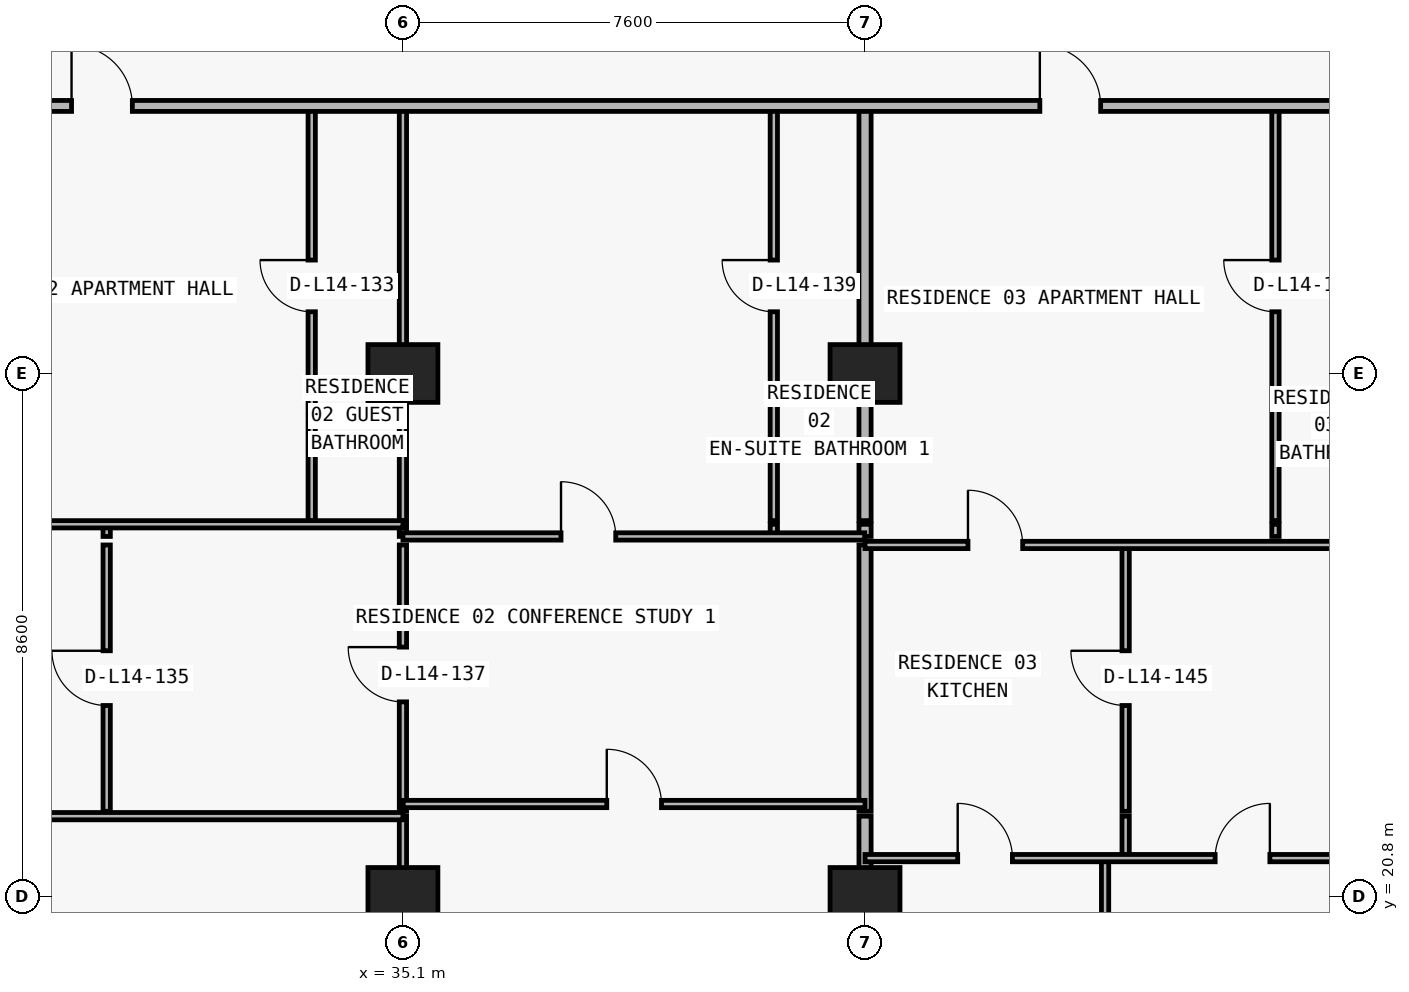
"""IFC4 building model, lengths in metres.
Left out: names, types, materials, properties, quantities, classifications, styles, units other than length and angle.
Written with IfcOpenShell. Run it as: python <this file> out.ifc"""

import sys

from ifc_helpers import new_model, si_unit, direction, frame, frame_2d, origin, origin_2d, place, context, subcontext, project, spatial, rectangle, extrude, element, fill, save


model = new_model("IFC4")
c1 = context("Model", 3, precision=1e-05, world=origin(), true_north=direction((0.0, 1.0)))
c2 = subcontext(c1, "Body", "Model", "MODEL_VIEW")
j1 = project(units=[si_unit("LENGTHUNIT", "METRE"), si_unit("PLANEANGLEUNIT", "RADIAN")], contexts=[c1])
p1 = place(None, origin())
s1 = spatial("IfcSite", under=j1, at=p1, CompositionType="ELEMENT")
p2 = place(p1, origin())
s2 = spatial("IfcBuilding", under=s1, at=p2, CompositionType="ELEMENT")
p3 = place(p2, frame((0.0, 0.0, 56.4)))
s3 = spatial("IfcBuildingStorey", under=s2, at=p3, CompositionType="ELEMENT", Elevation=56.4)
for number, where, z_axis, x_axis in (
    (1, (35.1, 20.8, 0.0), (0.0, 0.0, 1.0), (1.0, 0.0, 0.0)),
    (2, (42.7, 20.8, 0.0), (0.0, 0.0, 1.0), (1.0, 0.0, 0.0)),
    (3, (35.1, 29.4, 0.0), (0.0, 0.0, 1.0), (1.0, 0.0, 0.0)),
    (4, (42.7, 29.4, 0.0), (0.0, 0.0, 1.0), (1.0, 0.0, 0.0)),
):
    element("IfcColumn", number, at=place(p3, frame(where, z_axis=z_axis, x_axis=x_axis)), inside=s3, PredefinedType="COLUMN", context=c2, shape_type="SweptSolid", body=[
        extrude(rectangle(XDim=1.15, YDim=0.95, at=origin_2d()), origin(), (0.0, 0.0, 1.0), 3.05),
    ])
p4 = place(p3, frame((30.228, 22.2, 0.0), z_axis=(0.0, 0.0, 1.0), x_axis=(0.0, 1.0, 0.0)))
e5 = element("IfcWall", 5, at=p4, inside=s3, PredefinedType="PARTITIONING", context=c2, shape_type="SweptSolid", body=[
    extrude(rectangle(XDim=4.38, YDim=0.12, at=frame_2d((2.19, 0.0))), origin(), (0.0, 0.0, 1.0), 3.05),
])
p5 = place(p4, frame((1.74, 0.0, 0.0)))
e6 = element("IfcOpeningElement", 6, at=p5, cuts=e5, PredefinedType="OPENING", context=c2, shape_type="SweptSolid", body=[
    extrude(rectangle(XDim=0.9, YDim=2.15, at=frame_2d((0.45, 1.075))), frame((0.0, 0.07, 0.0), z_axis=(0.0, -1.0, 0.0), x_axis=(1.0, 0.0, 0.0)), (0.0, 0.0, 1.0), 0.14),
])
p6 = place(p3, frame((30.228, 26.72, 0.0), z_axis=(0.0, 0.0, 1.0), x_axis=(0.0, 1.0, 0.0)))
e7 = element("IfcWall", 7, at=p6, inside=s3, PredefinedType="PARTITIONING", context=c2, shape_type="SweptSolid", body=[
    extrude(rectangle(XDim=0.2, YDim=0.12, at=frame_2d((0.1, 0.0))), origin(), (0.0, 0.0, 1.0), 3.05),
])
p7 = place(p3, frame((33.6, 26.98, 0.0), z_axis=(0.0, 0.0, 1.0), x_axis=(0.0, 1.0, 0.0)))
e8 = element("IfcWall", 8, at=p7, inside=s3, PredefinedType="PARTITIONING", context=c2, shape_type="SweptSolid", body=[
    extrude(rectangle(XDim=6.82, YDim=0.12, at=frame_2d((3.41, 0.0))), origin(), (0.0, 0.0, 1.0), 3.05),
])
p8 = place(p7, frame((3.435, 0.0, 0.0)))
e9 = element("IfcOpeningElement", 9, at=p8, cuts=e8, PredefinedType="OPENING", context=c2, shape_type="SweptSolid", body=[
    extrude(rectangle(XDim=0.85, YDim=2.1, at=frame_2d((0.425, 1.05))), frame((0.0, 0.07, 0.0), z_axis=(0.0, -1.0, 0.0), x_axis=(1.0, 0.0, 0.0)), (0.0, 0.0, 1.0), 0.14),
])
p9 = place(p3, frame((35.1, 6.24, 0.0), z_axis=(0.0, 0.0, 1.0), x_axis=(0.0, 1.0, 0.0)))
e10 = element("IfcWall", 10, at=p9, inside=s3, PredefinedType="PARTITIONING", context=c2, shape_type="SweptSolid", body=[
    extrude(rectangle(XDim=15.88, YDim=0.12, at=frame_2d((7.94, 0.0))), origin(), (0.0, 0.0, 1.0), 2.11),
])
p10 = place(p3, frame((35.1, 22.2, 0.0), z_axis=(0.0, 0.0, 1.0), x_axis=(0.0, 1.0, 0.0)))
e11 = element("IfcWall", 11, at=p10, inside=s3, PredefinedType="PARTITIONING", context=c2, shape_type="SweptSolid", body=[
    extrude(rectangle(XDim=4.38, YDim=0.12, at=frame_2d((2.19, 0.0))), origin(), (0.0, 0.0, 1.0), 2.11),
])
p11 = place(p10, frame((1.8, 0.0, 0.0)))
e12 = element("IfcOpeningElement", 12, at=p11, cuts=e11, PredefinedType="OPENING", context=c2, shape_type="SweptSolid", body=[
    extrude(rectangle(XDim=0.9, YDim=2.06, at=frame_2d((0.45, 1.03))), frame((0.0, 0.07, 0.0), z_axis=(0.0, -1.0, 0.0), x_axis=(1.0, 0.0, 0.0)), (0.0, 0.0, 1.0), 0.14),
])
p12 = place(p3, frame((35.1, 26.72, 0.0), z_axis=(0.0, 0.0, 1.0), x_axis=(0.0, 1.0, 0.0)))
e13 = element("IfcWall", 13, at=p12, inside=s3, PredefinedType="PARTITIONING", context=c2, shape_type="SweptSolid", body=[
    extrude(rectangle(XDim=0.2, YDim=0.12, at=frame_2d((0.1, 0.0))), origin(), (0.0, 0.0, 1.0), 2.11),
])
p13 = place(p3, frame((35.1, 26.98, 0.0), z_axis=(0.0, 0.0, 1.0), x_axis=(0.0, 1.0, 0.0)))
e14 = element("IfcWall", 14, at=p13, inside=s3, PredefinedType="PARTITIONING", context=c2, shape_type="SweptSolid", body=[
    extrude(rectangle(XDim=6.82, YDim=0.12, at=frame_2d((3.41, 0.0))), origin(), (0.0, 0.0, 1.0), 2.11),
])
p14 = place(p3, frame((41.2, 26.72, 0.0), z_axis=(0.0, 0.0, 1.0), x_axis=(0.0, 1.0, 0.0)))
e15 = element("IfcWall", 15, at=p14, inside=s3, PredefinedType="PARTITIONING", context=c2, shape_type="SweptSolid", body=[
    extrude(rectangle(XDim=0.2, YDim=0.12, at=frame_2d((0.1, 0.0))), origin(), (0.0, 0.0, 1.0), 3.05),
])
p15 = place(p3, frame((41.2, 26.98, 0.0), z_axis=(0.0, 0.0, 1.0), x_axis=(0.0, 1.0, 0.0)))
e16 = element("IfcWall", 16, at=p15, inside=s3, PredefinedType="PARTITIONING", context=c2, shape_type="SweptSolid", body=[
    extrude(rectangle(XDim=6.82, YDim=0.12, at=frame_2d((3.41, 0.0))), origin(), (0.0, 0.0, 1.0), 3.05),
])
p16 = place(p15, frame((3.435, 0.0, 0.0)))
e17 = element("IfcOpeningElement", 17, at=p16, cuts=e16, PredefinedType="OPENING", context=c2, shape_type="SweptSolid", body=[
    extrude(rectangle(XDim=0.85, YDim=2.1, at=frame_2d((0.425, 1.05))), frame((0.0, 0.07, 0.0), z_axis=(0.0, -1.0, 0.0), x_axis=(1.0, 0.0, 0.0)), (0.0, 0.0, 1.0), 0.14),
])
p17 = place(p3, frame((42.7, 6.24, 0.0), z_axis=(0.0, 0.0, 1.0), x_axis=(0.0, 1.0, 0.0)))
e18 = element("IfcWall", 18, at=p17, inside=s3, PredefinedType="PARTITIONING", context=c2, shape_type="SweptSolid", body=[
    extrude(rectangle(XDim=15.88, YDim=0.2, at=frame_2d((7.94, 0.0))), origin(), (0.0, 0.0, 1.0), 2.11),
])
p18 = place(p3, frame((42.7, 22.2, 0.0), z_axis=(0.0, 0.0, 1.0), x_axis=(0.0, 1.0, 0.0)))
e19 = element("IfcWall", 19, at=p18, inside=s3, PredefinedType="PARTITIONING", context=c2, shape_type="SweptSolid", body=[
    extrude(rectangle(XDim=4.38, YDim=0.2, at=frame_2d((2.19, 0.0))), origin(), (0.0, 0.0, 1.0), 2.11),
])
p19 = place(p3, frame((42.7, 26.72, 0.0), z_axis=(0.0, 0.0, 1.0), x_axis=(0.0, 1.0, 0.0)))
e20 = element("IfcWall", 20, at=p19, inside=s3, PredefinedType="PARTITIONING", context=c2, shape_type="SweptSolid", body=[
    extrude(rectangle(XDim=0.2, YDim=0.2, at=frame_2d((0.1, 0.0))), origin(), (0.0, 0.0, 1.0), 2.11),
])
p20 = place(p3, frame((42.7, 26.98, 0.0), z_axis=(0.0, 0.0, 1.0), x_axis=(0.0, 1.0, 0.0)))
e21 = element("IfcWall", 21, at=p20, inside=s3, PredefinedType="PARTITIONING", context=c2, shape_type="SweptSolid", body=[
    extrude(rectangle(XDim=6.82, YDim=0.2, at=frame_2d((3.41, 0.0))), origin(), (0.0, 0.0, 1.0), 2.11),
])
p21 = place(p3, frame((46.648, 6.24, 0.0), z_axis=(0.0, 0.0, 1.0), x_axis=(0.0, 1.0, 0.0)))
e22 = element("IfcWall", 22, at=p21, inside=s3, PredefinedType="PARTITIONING", context=c2, shape_type="SweptSolid", body=[
    extrude(rectangle(XDim=15.19, YDim=0.12, at=frame_2d((7.595, 0.0))), origin(), (0.0, 0.0, 1.0), 3.05),
])
p22 = place(p3, frame((46.986, 21.43, 0.0), z_axis=(0.0, 0.0, 1.0), x_axis=(0.0, 1.0, 0.0)))
e23 = element("IfcWall", 23, at=p22, inside=s3, PredefinedType="PARTITIONING", context=c2, shape_type="SweptSolid", body=[
    extrude(rectangle(XDim=0.69, YDim=0.12, at=frame_2d((0.345, 0.0))), origin(), (0.0, 0.0, 1.0), 3.05),
])
p23 = place(p3, frame((46.986, 22.2, 0.0), z_axis=(0.0, 0.0, 1.0), x_axis=(0.0, 1.0, 0.0)))
e24 = element("IfcWall", 24, at=p23, inside=s3, PredefinedType="PARTITIONING", context=c2, shape_type="SweptSolid", body=[
    extrude(rectangle(XDim=4.38, YDim=0.12, at=frame_2d((2.19, 0.0))), origin(), (0.0, 0.0, 1.0), 3.05),
])
p24 = place(p23, frame((1.74, 0.0, 0.0)))
e25 = element("IfcOpeningElement", 25, at=p24, cuts=e24, PredefinedType="OPENING", context=c2, shape_type="SweptSolid", body=[
    extrude(rectangle(XDim=0.9, YDim=2.15, at=frame_2d((0.45, 1.075))), frame((0.0, 0.07, 0.0), z_axis=(0.0, -1.0, 0.0), x_axis=(1.0, 0.0, 0.0)), (0.0, 0.0, 1.0), 0.14),
])
p25 = place(p3, frame((49.45, 26.72, 0.0), z_axis=(0.0, 0.0, 1.0), x_axis=(0.0, 1.0, 0.0)))
e26 = element("IfcWall", 26, at=p25, inside=s3, PredefinedType="PARTITIONING", context=c2, shape_type="SweptSolid", body=[
    extrude(rectangle(XDim=0.2, YDim=0.12, at=frame_2d((0.1, 0.0))), origin(), (0.0, 0.0, 1.0), 3.05),
])
p26 = place(p3, frame((49.45, 26.98, 0.0), z_axis=(0.0, 0.0, 1.0), x_axis=(0.0, 1.0, 0.0)))
e27 = element("IfcWall", 27, at=p26, inside=s3, PredefinedType="PARTITIONING", context=c2, shape_type="SweptSolid", body=[
    extrude(rectangle(XDim=6.82, YDim=0.12, at=frame_2d((3.41, 0.0))), origin(), (0.0, 0.0, 1.0), 3.05),
])
p27 = place(p26, frame((3.435, 0.0, 0.0)))
e28 = element("IfcOpeningElement", 28, at=p27, cuts=e27, PredefinedType="OPENING", context=c2, shape_type="SweptSolid", body=[
    extrude(rectangle(XDim=0.85, YDim=2.1, at=frame_2d((0.425, 1.05))), frame((0.0, 0.07, 0.0), z_axis=(0.0, -1.0, 0.0), x_axis=(1.0, 0.0, 0.0)), (0.0, 0.0, 1.0), 0.14),
])
p28 = place(p3, frame((42.7, 21.43, 0.0), z_axis=(0.0, 0.0, 1.0), x_axis=(1.0, 0.0, 0.0)))
e29 = element("IfcWall", 29, at=p28, inside=s3, PredefinedType="PARTITIONING", context=c2, shape_type="SweptSolid", body=[
    extrude(rectangle(XDim=8.13, YDim=0.12, at=frame_2d((4.065, 0.0))), origin(), (0.0, 0.0, 1.0), 3.05),
])
p29 = place(p28, frame((1.524, 0.0, 0.0)))
e30 = element("IfcOpeningElement", 30, at=p29, cuts=e29, PredefinedType="OPENING", context=c2, shape_type="SweptSolid", body=[
    extrude(rectangle(XDim=0.9, YDim=2.15, at=frame_2d((0.45, 1.075))), frame((0.0, 0.07, 0.0), z_axis=(0.0, -1.0, 0.0), x_axis=(1.0, 0.0, 0.0)), (0.0, 0.0, 1.0), 0.14),
])
p30 = place(p28, frame((5.758, 0.0, 0.0)))
e31 = element("IfcOpeningElement", 31, at=p30, cuts=e29, PredefinedType="OPENING", context=c2, shape_type="SweptSolid", body=[
    extrude(rectangle(XDim=0.9, YDim=2.15, at=frame_2d((0.45, 1.075))), frame((0.0, 0.07, 0.0), z_axis=(0.0, -1.0, 0.0), x_axis=(1.0, 0.0, 0.0)), (0.0, 0.0, 1.0), 0.14),
])
p31 = place(p3, frame((26.97, 22.12, 0.0), z_axis=(0.0, 0.0, 1.0), x_axis=(1.0, 0.0, 0.0)))
e32 = element("IfcWall", 32, at=p31, inside=s3, PredefinedType="PARTITIONING", context=c2, shape_type="SweptSolid", body=[
    extrude(rectangle(XDim=8.13, YDim=0.12, at=frame_2d((4.065, 0.0))), origin(), (0.0, 0.0, 1.0), 3.05),
])
p32 = place(p31, frame((1.179, 0.0, 0.0)))
e33 = element("IfcOpeningElement", 33, at=p32, cuts=e32, PredefinedType="OPENING", context=c2, shape_type="SweptSolid", body=[
    extrude(rectangle(XDim=0.9, YDim=2.15, at=frame_2d((0.45, 1.075))), frame((0.0, 0.07, 0.0), z_axis=(0.0, -1.0, 0.0), x_axis=(1.0, 0.0, 0.0)), (0.0, 0.0, 1.0), 0.14),
])
p33 = place(p3, frame((35.105, 22.32, 0.0), z_axis=(0.0, 0.0, 1.0), x_axis=(1.0, 0.0, 0.0)))
e34 = element("IfcWall", 34, at=p33, inside=s3, PredefinedType="PARTITIONING", context=c2, shape_type="SweptSolid", body=[
    extrude(rectangle(XDim=7.595, YDim=0.12, at=frame_2d((3.797, 0.0))), origin(), (0.0, 0.0, 1.0), 3.05),
])
p34 = place(p33, frame((3.347, 0.0, 0.0)))
e35 = element("IfcOpeningElement", 35, at=p34, cuts=e34, PredefinedType="OPENING", context=c2, shape_type="SweptSolid", body=[
    extrude(rectangle(XDim=0.9, YDim=2.15, at=frame_2d((0.45, 1.075))), frame((0.0, 0.07, 0.0), z_axis=(0.0, -1.0, 0.0), x_axis=(1.0, 0.0, 0.0)), (0.0, 0.0, 1.0), 0.14),
])
p35 = place(p3, frame((42.7, 26.58, 0.0), z_axis=(0.0, 0.0, 1.0), x_axis=(1.0, 0.0, 0.0)))
e36 = element("IfcWall", 36, at=p35, inside=s3, PredefinedType="PARTITIONING", context=c2, shape_type="SweptSolid", body=[
    extrude(rectangle(XDim=8.13, YDim=0.12, at=frame_2d((4.065, 0.0))), origin(), (0.0, 0.0, 1.0), 3.05),
])
p36 = place(p35, frame((1.693, 0.0, 0.0)))
e37 = element("IfcOpeningElement", 37, at=p36, cuts=e36, PredefinedType="OPENING", context=c2, shape_type="SweptSolid", body=[
    extrude(rectangle(XDim=0.9, YDim=2.15, at=frame_2d((0.45, 1.075))), frame((0.0, 0.07, 0.0), z_axis=(0.0, -1.0, 0.0), x_axis=(1.0, 0.0, 0.0)), (0.0, 0.0, 1.0), 0.14),
])
p37 = place(p3, frame((35.1, 26.72, 0.0), z_axis=(0.0, 0.0, 1.0), x_axis=(1.0, 0.0, 0.0)))
e38 = element("IfcWall", 38, at=p37, inside=s3, PredefinedType="PARTITIONING", context=c2, shape_type="SweptSolid", body=[
    extrude(rectangle(XDim=7.595, YDim=0.12, at=frame_2d((3.797, 0.0))), origin(), (0.0, 0.0, 1.0), 3.05),
])
p38 = place(p37, frame((2.6, 0.0, 0.0)))
e39 = element("IfcOpeningElement", 39, at=p38, cuts=e38, PredefinedType="OPENING", context=c2, shape_type="SweptSolid", body=[
    extrude(rectangle(XDim=0.9, YDim=2.15, at=frame_2d((0.45, 1.075))), frame((0.0, 0.07, 0.0), z_axis=(0.0, -1.0, 0.0), x_axis=(1.0, 0.0, 0.0)), (0.0, 0.0, 1.0), 0.14),
])
p39 = place(p3, frame((26.97, 26.92, 0.0), z_axis=(0.0, 0.0, 1.0), x_axis=(1.0, 0.0, 0.0)))
e40 = element("IfcWall", 40, at=p39, inside=s3, PredefinedType="PARTITIONING", context=c2, shape_type="SweptSolid", body=[
    extrude(rectangle(XDim=8.13, YDim=0.12, at=frame_2d((4.065, 0.0))), origin(), (0.0, 0.0, 1.0), 3.05),
])
p40 = place(p39, frame((1.179, 0.0, 0.0)))
e41 = element("IfcOpeningElement", 41, at=p40, cuts=e40, PredefinedType="OPENING", context=c2, shape_type="SweptSolid", body=[
    extrude(rectangle(XDim=0.9, YDim=2.15, at=frame_2d((0.45, 1.075))), frame((0.0, 0.07, 0.0), z_axis=(0.0, -1.0, 0.0), x_axis=(1.0, 0.0, 0.0)), (0.0, 0.0, 1.0), 0.14),
])
p41 = place(p3, frame((5.105, 33.8, 0.0), z_axis=(0.0, 0.0, 1.0), x_axis=(1.0, 0.0, 0.0)))
e42 = element("IfcWall", 42, at=p41, inside=s3, PredefinedType="PARTITIONING", context=c2, shape_type="SweptSolid", body=[
    extrude(rectangle(XDim=67.595, YDim=0.18, at=frame_2d((33.797, 0.0))), origin(), (0.0, 0.0, 1.0), 3.05),
])
p42 = place(p41, frame((7.745, 0.0, 0.0)))
e43 = element("IfcOpeningElement", 43, at=p42, cuts=e42, PredefinedType="OPENING", context=c2, shape_type="SweptSolid", body=[
    extrude(rectangle(XDim=1.0, YDim=2.2, at=frame_2d((0.5, 1.1))), frame((0.0, 0.1, 0.0), z_axis=(0.0, -1.0, 0.0), x_axis=(1.0, 0.0, 0.0)), (0.0, 0.0, 1.0), 0.2),
])
p43 = place(p41, frame((24.545, 0.0, 0.0)))
e44 = element("IfcOpeningElement", 44, at=p43, cuts=e42, PredefinedType="OPENING", context=c2, shape_type="SweptSolid", body=[
    extrude(rectangle(XDim=1.0, YDim=2.2, at=frame_2d((0.5, 1.1))), frame((0.0, 0.1, 0.0), z_axis=(0.0, -1.0, 0.0), x_axis=(1.0, 0.0, 0.0)), (0.0, 0.0, 1.0), 0.2),
])
p44 = place(p41, frame((40.47, 0.0, 0.0)))
e45 = element("IfcOpeningElement", 45, at=p44, cuts=e42, PredefinedType="OPENING", context=c2, shape_type="SweptSolid", body=[
    extrude(rectangle(XDim=1.0, YDim=2.2, at=frame_2d((0.5, 1.1))), frame((0.0, 0.1, 0.0), z_axis=(0.0, -1.0, 0.0), x_axis=(1.0, 0.0, 0.0)), (0.0, 0.0, 1.0), 0.2),
])
p45 = place(p41, frame((48.87, 0.0, 0.0)))
e46 = element("IfcOpeningElement", 46, at=p45, cuts=e42, PredefinedType="OPENING", context=c2, shape_type="SweptSolid", body=[
    extrude(rectangle(XDim=1.0, YDim=2.2, at=frame_2d((0.5, 1.1))), frame((0.0, 0.1, 0.0), z_axis=(0.0, -1.0, 0.0), x_axis=(1.0, 0.0, 0.0)), (0.0, 0.0, 1.0), 0.2),
])
p46 = place(p41, frame((57.27, 0.0, 0.0)))
e47 = element("IfcOpeningElement", 47, at=p46, cuts=e42, PredefinedType="OPENING", context=c2, shape_type="SweptSolid", body=[
    extrude(rectangle(XDim=1.0, YDim=2.2, at=frame_2d((0.5, 1.1))), frame((0.0, 0.1, 0.0), z_axis=(0.0, -1.0, 0.0), x_axis=(1.0, 0.0, 0.0)), (0.0, 0.0, 1.0), 0.2),
])
p47 = place(p43, origin())
e48 = element("IfcDoor", 48, at=p47, inside=s3, OperationType="SINGLE_SWING_LEFT", PredefinedType="DOOR", context=c2, shape_type="SweptSolid", body=[
    extrude(rectangle(XDim=1.0, YDim=2.2, at=frame_2d((0.5, 1.1))), frame((0.0, 0.025, 0.0), z_axis=(0.0, -1.0, 0.0), x_axis=(1.0, 0.0, 0.0)), (0.0, 0.0, 1.0), 0.05),
])
fill(e44, e48)
p48 = place(p8, origin())
e49 = element("IfcDoor", 49, at=p48, inside=s3, OperationType="SINGLE_SWING_RIGHT", PredefinedType="DOOR", context=c2, shape_type="SweptSolid", body=[
    extrude(rectangle(XDim=0.85, YDim=2.1, at=frame_2d((0.425, 1.05))), frame((0.0, 0.025, 0.0), z_axis=(0.0, -1.0, 0.0), x_axis=(1.0, 0.0, 0.0)), (0.0, 0.0, 1.0), 0.05),
])
fill(e9, e49)
p49 = place(p5, origin())
e50 = element("IfcDoor", 50, at=p49, inside=s3, OperationType="SINGLE_SWING_RIGHT", PredefinedType="DOOR", context=c2, shape_type="SweptSolid", body=[
    extrude(rectangle(XDim=0.9, YDim=2.15, at=frame_2d((0.45, 1.075))), frame((0.0, 0.025, 0.0), z_axis=(0.0, -1.0, 0.0), x_axis=(1.0, 0.0, 0.0)), (0.0, 0.0, 1.0), 0.05),
])
fill(e6, e50)
p50 = place(p11, origin())
e51 = element("IfcDoor", 51, at=p50, inside=s3, OperationType="SINGLE_SWING_RIGHT", PredefinedType="DOOR", context=c2, shape_type="SweptSolid", body=[
    extrude(rectangle(XDim=0.9, YDim=2.06, at=frame_2d((0.45, 1.03))), frame((0.0, 0.025, 0.0), z_axis=(0.0, -1.0, 0.0), x_axis=(1.0, 0.0, 0.0)), (0.0, 0.0, 1.0), 0.05),
])
fill(e12, e51)
p51 = place(p38, origin())
e52 = element("IfcDoor", 52, at=p51, inside=s3, OperationType="SINGLE_SWING_LEFT", PredefinedType="DOOR", context=c2, shape_type="SweptSolid", body=[
    extrude(rectangle(XDim=0.9, YDim=2.15, at=frame_2d((0.45, 1.075))), frame((0.0, 0.025, 0.0), z_axis=(0.0, -1.0, 0.0), x_axis=(1.0, 0.0, 0.0)), (0.0, 0.0, 1.0), 0.05),
])
fill(e39, e52)
p52 = place(p16, origin())
e53 = element("IfcDoor", 53, at=p52, inside=s3, OperationType="SINGLE_SWING_RIGHT", PredefinedType="DOOR", context=c2, shape_type="SweptSolid", body=[
    extrude(rectangle(XDim=0.85, YDim=2.1, at=frame_2d((0.425, 1.05))), frame((0.0, 0.025, 0.0), z_axis=(0.0, -1.0, 0.0), x_axis=(1.0, 0.0, 0.0)), (0.0, 0.0, 1.0), 0.05),
])
fill(e17, e53)
p53 = place(p34, origin())
e54 = element("IfcDoor", 54, at=p53, inside=s3, OperationType="SINGLE_SWING_LEFT", PredefinedType="DOOR", context=c2, shape_type="SweptSolid", body=[
    extrude(rectangle(XDim=0.9, YDim=2.15, at=frame_2d((0.45, 1.075))), frame((0.0, 0.025, 0.0), z_axis=(0.0, -1.0, 0.0), x_axis=(1.0, 0.0, 0.0)), (0.0, 0.0, 1.0), 0.05),
])
fill(e35, e54)
p54 = place(p44, origin())
e55 = element("IfcDoor", 55, at=p54, inside=s3, OperationType="SINGLE_SWING_LEFT", PredefinedType="DOOR", context=c2, shape_type="SweptSolid", body=[
    extrude(rectangle(XDim=1.0, YDim=2.2, at=frame_2d((0.5, 1.1))), frame((0.0, 0.025, 0.0), z_axis=(0.0, -1.0, 0.0), x_axis=(1.0, 0.0, 0.0)), (0.0, 0.0, 1.0), 0.05),
])
fill(e45, e55)
p55 = place(p27, origin())
e56 = element("IfcDoor", 56, at=p55, inside=s3, OperationType="SINGLE_SWING_RIGHT", PredefinedType="DOOR", context=c2, shape_type="SweptSolid", body=[
    extrude(rectangle(XDim=0.85, YDim=2.1, at=frame_2d((0.425, 1.05))), frame((0.0, 0.025, 0.0), z_axis=(0.0, -1.0, 0.0), x_axis=(1.0, 0.0, 0.0)), (0.0, 0.0, 1.0), 0.05),
])
fill(e28, e56)
p56 = place(p36, origin())
e57 = element("IfcDoor", 57, at=p56, inside=s3, OperationType="SINGLE_SWING_LEFT", PredefinedType="DOOR", context=c2, shape_type="SweptSolid", body=[
    extrude(rectangle(XDim=0.9, YDim=2.15, at=frame_2d((0.45, 1.075))), frame((0.0, 0.025, 0.0), z_axis=(0.0, -1.0, 0.0), x_axis=(1.0, 0.0, 0.0)), (0.0, 0.0, 1.0), 0.05),
])
fill(e37, e57)
p57 = place(p24, origin())
e58 = element("IfcDoor", 58, at=p57, inside=s3, OperationType="SINGLE_SWING_RIGHT", PredefinedType="DOOR", context=c2, shape_type="SweptSolid", body=[
    extrude(rectangle(XDim=0.9, YDim=2.15, at=frame_2d((0.45, 1.075))), frame((0.0, 0.025, 0.0), z_axis=(0.0, -1.0, 0.0), x_axis=(1.0, 0.0, 0.0)), (0.0, 0.0, 1.0), 0.05),
])
fill(e25, e58)
p58 = place(p29, origin())
e59 = element("IfcDoor", 59, at=p58, inside=s3, OperationType="SINGLE_SWING_LEFT", PredefinedType="DOOR", context=c2, shape_type="SweptSolid", body=[
    extrude(rectangle(XDim=0.9, YDim=2.15, at=frame_2d((0.45, 1.075))), frame((0.0, 0.025, 0.0), z_axis=(0.0, -1.0, 0.0), x_axis=(1.0, 0.0, 0.0)), (0.0, 0.0, 1.0), 0.05),
])
fill(e30, e59)
p59 = place(p30, origin())
e60 = element("IfcDoor", 60, at=p59, inside=s3, OperationType="SINGLE_SWING_RIGHT", PredefinedType="DOOR", context=c2, shape_type="SweptSolid", body=[
    extrude(rectangle(XDim=0.9, YDim=2.15, at=frame_2d((0.45, 1.075))), frame((0.0, 0.025, 0.0), z_axis=(0.0, -1.0, 0.0), x_axis=(1.0, 0.0, 0.0)), (0.0, 0.0, 1.0), 0.05),
])
fill(e31, e60)
save(model, sys.argv[1])
